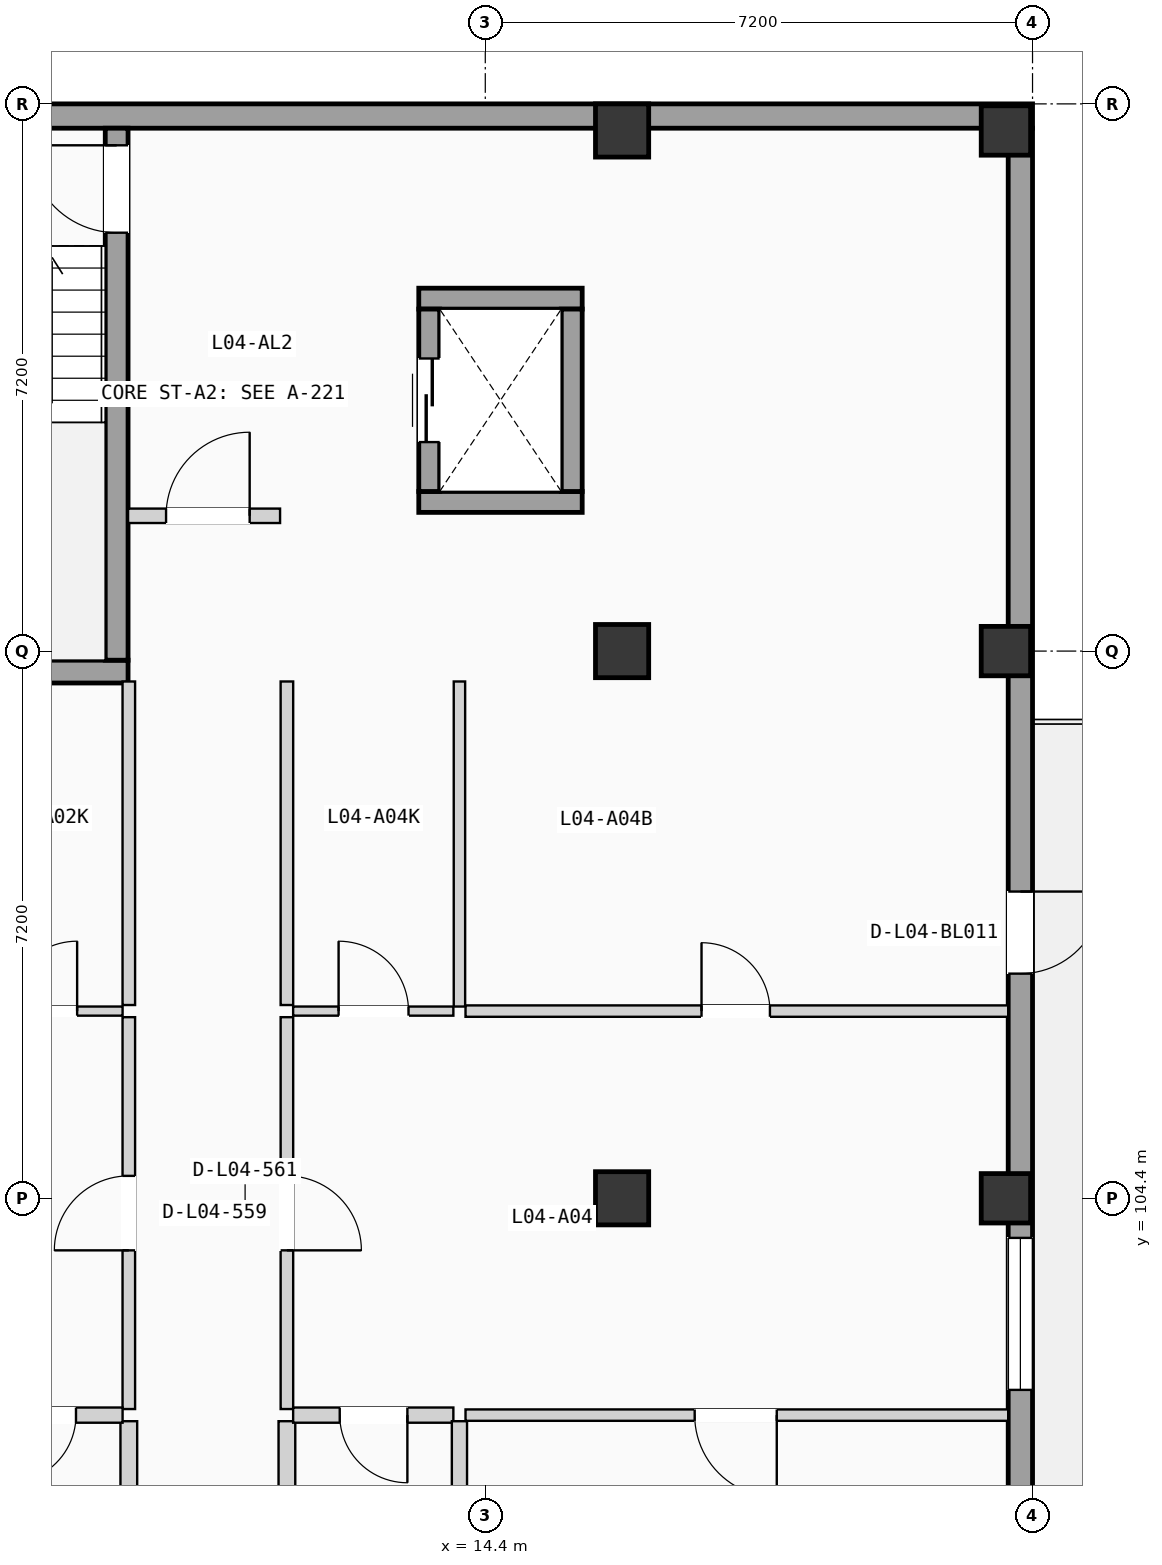
"""IFC4 building model, lengths in metres.
Left out: names, types, materials, properties, quantities, classifications, styles, units other than length and angle.
Written with IfcOpenShell. Run it as: python <this file> out.ifc"""

import sys

from ifc_helpers import new_model, si_unit, direction, frame, frame_2d, origin, origin_2d, place, context, subcontext, project, spatial, rectangle, extrude, element, fill, save


model = new_model("IFC4")
c1 = context("Model", 3, precision=1e-05, world=origin(), true_north=direction((0.0, 1.0)))
c2 = subcontext(c1, "Body", "Model", "MODEL_VIEW")
j1 = project(units=[si_unit("LENGTHUNIT", "METRE"), si_unit("PLANEANGLEUNIT", "RADIAN")], contexts=[c1])
p1 = place(None, origin())
s1 = spatial("IfcSite", under=j1, at=p1, CompositionType="ELEMENT")
p2 = place(p1, origin())
s2 = spatial("IfcBuilding", under=s1, at=p2, CompositionType="ELEMENT")
p3 = place(p2, frame((0.0, 0.0, 15.225)))
s3 = spatial("IfcBuildingStorey", under=s2, at=p3, CompositionType="ELEMENT", Elevation=15.225)
for number, where, z_axis, x_axis in (
    (1, (16.2, 104.4, 0.0), (0.0, 0.0, 1.0), (1.0, 0.0, 0.0)),
    (2, (16.2, 111.6, 0.0), (0.0, 0.0, 1.0), (1.0, 0.0, 0.0)),
    (3, (16.2, 118.45, 0.0), (0.0, 0.0, 1.0), (1.0, 0.0, 0.0)),
):
    element("IfcColumn", number, at=place(p3, frame(where, z_axis=z_axis, x_axis=x_axis)), inside=s3, PredefinedType="COLUMN", context=c2, shape_type="SweptSolid", body=[
        extrude(rectangle(XDim=0.7, YDim=0.7, at=origin_2d()), origin(), (0.0, 0.0, 1.0), 3.15),
    ])
for number, where, z_axis, x_axis in (
    (4, (21.25, 104.4, 0.0), (0.0, 0.0, 1.0), (1.0, 0.0, 0.0)),
    (5, (21.25, 111.6, 0.0), (0.0, 0.0, 1.0), (1.0, 0.0, 0.0)),
    (6, (21.25, 118.45, 0.0), (0.0, 0.0, 1.0), (1.0, 0.0, 0.0)),
):
    element("IfcColumn", number, at=place(p3, frame(where, z_axis=z_axis, x_axis=x_axis)), inside=s3, PredefinedType="COLUMN", context=c2, shape_type="SweptSolid", body=[
        extrude(rectangle(XDim=0.65, YDim=0.65, at=origin_2d()), origin(), (0.0, 0.0, 1.0), 3.15),
    ])
p4 = place(p3, frame((0.0, 118.64, 0.0), z_axis=(0.0, 0.0, 1.0), x_axis=(1.0, 0.0, 0.0)))
e7 = element("IfcWall", 7, at=p4, inside=s3, PredefinedType="SOLIDWALL", context=c2, shape_type="SweptSolid", body=[
    extrude(rectangle(XDim=21.6, YDim=0.32, at=frame_2d((10.8, 0.0))), origin(), (0.0, 0.0, 1.0), 2.89),
])
p5 = place(p3, frame((21.44, 68.72, 0.0), z_axis=(0.0, 0.0, 1.0), x_axis=(0.0, 1.0, 0.0)))
e8 = element("IfcWall", 8, at=p5, inside=s3, PredefinedType="SOLIDWALL", context=c2, shape_type="SweptSolid", body=[
    extrude(rectangle(XDim=49.76, YDim=0.32, at=frame_2d((24.88, 0.0))), origin(), (0.0, 0.0, 1.0), 2.89),
])
p6 = place(p5, frame((16.38, 0.0, 0.0)))
e9 = element("IfcOpeningElement", 9, at=p6, cuts=e8, PredefinedType="OPENING", context=c2, shape_type="SweptSolid", body=[
    extrude(rectangle(XDim=0.95, YDim=2.15, at=frame_2d((0.475, 1.075))), frame((0.0, 0.17, 0.0), z_axis=(0.0, -1.0, 0.0), x_axis=(1.0, 0.0, 0.0)), (0.0, 0.0, 1.0), 0.34),
])
p7 = place(p5, frame((10.07, 0.0, 0.85)))
e10 = element("IfcOpeningElement", 10, at=p7, cuts=e8, PredefinedType="OPENING", context=c2, shape_type="SweptSolid", body=[
    extrude(rectangle(XDim=0.95, YDim=1.2, at=frame_2d((0.475, 0.6))), frame((0.0, 0.17, 0.0), z_axis=(0.0, -1.0, 0.0), x_axis=(1.0, 0.0, 0.0)), (0.0, 0.0, 1.0), 0.34),
])
p8 = place(p5, frame((23.88, 0.0, 0.9)))
e11 = element("IfcOpeningElement", 11, at=p8, cuts=e8, PredefinedType="OPENING", context=c2, shape_type="SweptSolid", body=[
    extrude(rectangle(XDim=2.0, YDim=1.2, at=frame_2d((1.0, 0.6))), frame((0.0, 0.17, 0.0), z_axis=(0.0, -1.0, 0.0), x_axis=(1.0, 0.0, 0.0)), (0.0, 0.0, 1.0), 0.34),
])
p9 = place(p5, frame((33.159, 0.0, 0.855)))
e12 = element("IfcOpeningElement", 12, at=p9, cuts=e8, PredefinedType="OPENING", context=c2, shape_type="SweptSolid", body=[
    extrude(rectangle(XDim=2.0, YDim=1.35, at=frame_2d((1.0, 0.675))), frame((0.0, 0.17, 0.0), z_axis=(0.0, -1.0, 0.0), x_axis=(1.0, 0.0, 0.0)), (0.0, 0.0, 1.0), 0.34),
])
p10 = place(p5, frame((29.749, 0.0, 0.705)))
e13 = element("IfcOpeningElement", 13, at=p10, cuts=e8, PredefinedType="OPENING", context=c2, shape_type="SweptSolid", body=[
    extrude(rectangle(XDim=2.0, YDim=1.5, at=frame_2d((1.0, 0.75))), frame((0.0, 0.17, 0.0), z_axis=(0.0, -1.0, 0.0), x_axis=(1.0, 0.0, 0.0)), (0.0, 0.0, 1.0), 0.34),
])
p11 = place(p5, frame((38.636, 0.0, 0.0)))
e14 = element("IfcOpeningElement", 14, at=p11, cuts=e8, PredefinedType="OPENING", context=c2, shape_type="SweptSolid", body=[
    extrude(rectangle(XDim=1.08, YDim=2.18, at=frame_2d((0.54, 1.09))), frame((0.0, 0.17, 0.0), z_axis=(0.0, -1.0, 0.0), x_axis=(1.0, 0.0, 0.0)), (0.0, 0.0, 1.0), 0.34),
])
p12 = place(p3, frame((5.75, 111.33, 0.0), z_axis=(0.0, 0.0, 1.0), x_axis=(1.0, 0.0, 0.0)))
e15 = element("IfcWall", 15, at=p12, inside=s3, PredefinedType="SHEAR", context=c2, shape_type="SweptSolid", body=[
    extrude(rectangle(XDim=3.95, YDim=0.3, at=frame_2d((1.975, 0.0))), origin(), (0.0, 0.0, 1.0), 2.89),
])
p13 = place(p3, frame((9.55, 111.48, 0.0), z_axis=(0.0, 0.0, 1.0), x_axis=(0.0, 1.0, 0.0)))
e16 = element("IfcWall", 16, at=p13, inside=s3, PredefinedType="SHEAR", context=c2, shape_type="SweptSolid", body=[
    extrude(rectangle(XDim=7.0, YDim=0.3, at=frame_2d((3.5, 0.0))), origin(), (0.0, 0.0, 1.0), 2.89),
])
p14 = place(p13, frame((5.625, 0.0, 0.0)))
e17 = element("IfcOpeningElement", 17, at=p14, cuts=e16, PredefinedType="OPENING", context=c2, shape_type="SweptSolid", body=[
    extrude(rectangle(XDim=1.15, YDim=2.12, at=frame_2d((0.575, 1.06))), frame((0.0, 0.16, 0.0), z_axis=(0.0, -1.0, 0.0), x_axis=(1.0, 0.0, 0.0)), (0.0, 0.0, 1.0), 0.32),
])
for number, where, z_axis, x_axis in (
    (18, (13.525, 113.562, 0.0), (0.0, 0.0, 1.0), (1.0, 0.0, 0.0)),
    (19, (13.525, 116.238, 0.0), (0.0, 0.0, 1.0), (1.0, 0.0, 0.0)),
):
    element("IfcWall", number, at=place(p3, frame(where, z_axis=z_axis, x_axis=x_axis)), inside=s3, PredefinedType="SHEAR", context=c2, shape_type="SweptSolid", body=[
        extrude(rectangle(XDim=2.15, YDim=0.275, at=frame_2d((1.075, 0.0))), origin(), (0.0, 0.0, 1.0), 2.89),
    ])
p15 = place(p3, frame((13.663, 113.7, 0.0), z_axis=(0.0, 0.0, 1.0), x_axis=(0.0, 1.0, 0.0)))
e20 = element("IfcWall", 20, at=p15, inside=s3, PredefinedType="SHEAR", context=c2, shape_type="SweptSolid", body=[
    extrude(rectangle(XDim=2.4, YDim=0.275, at=frame_2d((1.2, 0.0))), origin(), (0.0, 0.0, 1.0), 2.89),
])
p16 = place(p15, frame((0.65, 0.0, 0.0)))
e21 = element("IfcOpeningElement", 21, at=p16, cuts=e20, PredefinedType="OPENING", context=c2, shape_type="SweptSolid", body=[
    extrude(rectangle(XDim=1.1, YDim=2.15, at=frame_2d((0.55, 1.075))), frame((0.0, 0.147, 0.0), z_axis=(0.0, -1.0, 0.0), x_axis=(1.0, 0.0, 0.0)), (0.0, 0.0, 1.0), 0.295),
])
p17 = place(p3, frame((15.538, 113.7, 0.0), z_axis=(0.0, 0.0, 1.0), x_axis=(0.0, 1.0, 0.0)))
e22 = element("IfcWall", 22, at=p17, inside=s3, PredefinedType="SHEAR", context=c2, shape_type="SweptSolid", body=[
    extrude(rectangle(XDim=2.4, YDim=0.275, at=frame_2d((1.2, 0.0))), origin(), (0.0, 0.0, 1.0), 2.89),
])
p18 = place(p3, frame((9.7, 113.38, 0.0), z_axis=(0.0, 0.0, 1.0), x_axis=(1.0, 0.0, 0.0)))
e23 = element("IfcWall", 23, at=p18, inside=s3, PredefinedType="PARTITIONING", context=c2, shape_type="SweptSolid", body=[
    extrude(rectangle(XDim=2.0, YDim=0.19, at=frame_2d((1.0, 0.0))), origin(), (0.0, 0.0, 1.0), 2.87),
])
p19 = place(p18, frame((0.5, 0.0, 0.0)))
e24 = element("IfcOpeningElement", 24, at=p19, cuts=e23, PredefinedType="OPENING", context=c2, shape_type="SweptSolid", body=[
    extrude(rectangle(XDim=1.1, YDim=2.12, at=frame_2d((0.55, 1.06))), frame((0.0, 0.105, 0.0), z_axis=(0.0, -1.0, 0.0), x_axis=(1.0, 0.0, 0.0)), (0.0, 0.0, 1.0), 0.21),
])
p20 = place(p3, frame((9.71, 101.627, 0.0), z_axis=(0.0, 0.0, 1.0), x_axis=(0.0, 1.0, 0.0)))
e25 = element("IfcWall", 25, at=p20, inside=s3, PredefinedType="PARTITIONING", context=c2, shape_type="SweptSolid", body=[
    extrude(rectangle(XDim=5.156, YDim=0.165, at=frame_2d((2.578, 0.0))), origin(), (0.0, 0.0, 1.0), 2.87),
])
p21 = place(p20, frame((2.088, 0.0, 0.0)))
e26 = element("IfcOpeningElement", 26, at=p21, cuts=e25, PredefinedType="OPENING", context=c2, shape_type="SweptSolid", body=[
    extrude(rectangle(XDim=0.98, YDim=2.08, at=frame_2d((0.49, 1.04))), frame((0.0, 0.093, 0.0), z_axis=(0.0, -1.0, 0.0), x_axis=(1.0, 0.0, 0.0)), (0.0, 0.0, 1.0), 0.185),
])
p22 = place(p3, frame((9.71, 97.21, 0.0), z_axis=(0.0, 0.0, 1.0), x_axis=(0.0, 1.0, 0.0)))
e27 = element("IfcWall", 27, at=p22, inside=s3, PredefinedType="PLUMBINGWALL", context=c2, shape_type="SweptSolid", body=[
    extrude(rectangle(XDim=4.257, YDim=0.22, at=frame_2d((2.128, 0.0))), origin(), (0.0, 0.0, 1.0), 2.87),
])
p23 = place(p3, frame((9.71, 106.943, 0.0), z_axis=(0.0, 0.0, 1.0), x_axis=(0.0, 1.0, 0.0)))
e28 = element("IfcWall", 28, at=p23, inside=s3, PredefinedType="PARTITIONING", context=c2, shape_type="SweptSolid", body=[
    extrude(rectangle(XDim=4.257, YDim=0.165, at=frame_2d((2.128, 0.0))), origin(), (0.0, 0.0, 1.0), 2.87),
])
p24 = place(p3, frame((11.79, 101.627, 0.0), z_axis=(0.0, 0.0, 1.0), x_axis=(0.0, 1.0, 0.0)))
e29 = element("IfcWall", 29, at=p24, inside=s3, PredefinedType="PARTITIONING", context=c2, shape_type="SweptSolid", body=[
    extrude(rectangle(XDim=5.156, YDim=0.165, at=frame_2d((2.578, 0.0))), origin(), (0.0, 0.0, 1.0), 2.87),
])
p25 = place(p24, frame((2.088, 0.0, 0.0)))
e30 = element("IfcOpeningElement", 30, at=p25, cuts=e29, PredefinedType="OPENING", context=c2, shape_type="SweptSolid", body=[
    extrude(rectangle(XDim=0.98, YDim=2.08, at=frame_2d((0.49, 1.04))), frame((0.0, 0.093, 0.0), z_axis=(0.0, -1.0, 0.0), x_axis=(1.0, 0.0, 0.0)), (0.0, 0.0, 1.0), 0.185),
])
p26 = place(p3, frame((11.79, 97.21, 0.0), z_axis=(0.0, 0.0, 1.0), x_axis=(0.0, 1.0, 0.0)))
e31 = element("IfcWall", 31, at=p26, inside=s3, PredefinedType="PLUMBINGWALL", context=c2, shape_type="SweptSolid", body=[
    extrude(rectangle(XDim=4.257, YDim=0.22, at=frame_2d((2.128, 0.0))), origin(), (0.0, 0.0, 1.0), 2.87),
])
p27 = place(p3, frame((11.79, 106.943, 0.0), z_axis=(0.0, 0.0, 1.0), x_axis=(0.0, 1.0, 0.0)))
e32 = element("IfcWall", 32, at=p27, inside=s3, PredefinedType="PARTITIONING", context=c2, shape_type="SweptSolid", body=[
    extrude(rectangle(XDim=4.257, YDim=0.165, at=frame_2d((2.128, 0.0))), origin(), (0.0, 0.0, 1.0), 2.87),
])
p28 = place(p3, frame((7.52, 101.547, 0.0), z_axis=(0.0, 0.0, 1.0), x_axis=(1.0, 0.0, 0.0)))
e33 = element("IfcWall", 33, at=p28, inside=s3, PredefinedType="PLUMBINGWALL", context=c2, shape_type="SweptSolid", body=[
    extrude(rectangle(XDim=2.108, YDim=0.2, at=frame_2d((1.054, 0.0))), origin(), (0.0, 0.0, 1.0), 2.87),
])
p29 = place(p28, frame((0.605, 0.0, 0.0)))
e34 = element("IfcOpeningElement", 34, at=p29, cuts=e33, PredefinedType="OPENING", context=c2, shape_type="SweptSolid", body=[
    extrude(rectangle(XDim=0.89, YDim=2.03, at=frame_2d((0.445, 1.015))), frame((0.0, 0.11, 0.0), z_axis=(0.0, -1.0, 0.0), x_axis=(1.0, 0.0, 0.0)), (0.0, 0.0, 1.0), 0.22),
])
p30 = place(p3, frame((7.52, 106.863, 0.0), z_axis=(0.0, 0.0, 1.0), x_axis=(1.0, 0.0, 0.0)))
e35 = element("IfcWall", 35, at=p30, inside=s3, PredefinedType="PARTITIONING", context=c2, shape_type="SweptSolid", body=[
    extrude(rectangle(XDim=2.108, YDim=0.12, at=frame_2d((1.054, 0.0))), origin(), (0.0, 0.0, 1.0), 2.87),
])
p31 = place(p30, frame((0.59, 0.0, 0.0)))
e36 = element("IfcOpeningElement", 36, at=p31, cuts=e35, PredefinedType="OPENING", context=c2, shape_type="SweptSolid", body=[
    extrude(rectangle(XDim=0.92, YDim=2.02, at=frame_2d((0.46, 1.01))), frame((0.0, 0.07, 0.0), z_axis=(0.0, -1.0, 0.0), x_axis=(1.0, 0.0, 0.0)), (0.0, 0.0, 1.0), 0.14),
])
p32 = place(p3, frame((11.872, 101.547, 0.0), z_axis=(0.0, 0.0, 1.0), x_axis=(1.0, 0.0, 0.0)))
e37 = element("IfcWall", 37, at=p32, inside=s3, PredefinedType="PLUMBINGWALL", context=c2, shape_type="SweptSolid", body=[
    extrude(rectangle(XDim=2.108, YDim=0.2, at=frame_2d((1.054, 0.0))), origin(), (0.0, 0.0, 1.0), 2.87),
])
p33 = place(p32, frame((0.613, 0.0, 0.0)))
e38 = element("IfcOpeningElement", 38, at=p33, cuts=e37, PredefinedType="OPENING", context=c2, shape_type="SweptSolid", body=[
    extrude(rectangle(XDim=0.89, YDim=2.03, at=frame_2d((0.445, 1.015))), frame((0.0, 0.11, 0.0), z_axis=(0.0, -1.0, 0.0), x_axis=(1.0, 0.0, 0.0)), (0.0, 0.0, 1.0), 0.22),
])
p34 = place(p3, frame((11.872, 106.863, 0.0), z_axis=(0.0, 0.0, 1.0), x_axis=(1.0, 0.0, 0.0)))
e39 = element("IfcWall", 39, at=p34, inside=s3, PredefinedType="PARTITIONING", context=c2, shape_type="SweptSolid", body=[
    extrude(rectangle(XDim=2.108, YDim=0.12, at=frame_2d((1.054, 0.0))), origin(), (0.0, 0.0, 1.0), 2.87),
])
p35 = place(p34, frame((0.598, 0.0, 0.0)))
e40 = element("IfcOpeningElement", 40, at=p35, cuts=e39, PredefinedType="OPENING", context=c2, shape_type="SweptSolid", body=[
    extrude(rectangle(XDim=0.92, YDim=2.02, at=frame_2d((0.46, 1.01))), frame((0.0, 0.07, 0.0), z_axis=(0.0, -1.0, 0.0), x_axis=(1.0, 0.0, 0.0)), (0.0, 0.0, 1.0), 0.14),
])
p36 = place(p3, frame((14.14, 101.547, 0.0), z_axis=(0.0, 0.0, 1.0), x_axis=(1.0, 0.0, 0.0)))
e41 = element("IfcWall", 41, at=p36, inside=s3, PredefinedType="PARTITIONING", context=c2, shape_type="SweptSolid", body=[
    extrude(rectangle(XDim=7.14, YDim=0.15, at=frame_2d((3.57, 0.0))), origin(), (0.0, 0.0, 1.0), 2.87),
])
p37 = place(p36, frame((3.015, 0.0, 0.0)))
e42 = element("IfcOpeningElement", 42, at=p37, cuts=e41, PredefinedType="OPENING", context=c2, shape_type="SweptSolid", body=[
    extrude(rectangle(XDim=1.08, YDim=2.1, at=frame_2d((0.54, 1.05))), frame((0.0, 0.085, 0.0), z_axis=(0.0, -1.0, 0.0), x_axis=(1.0, 0.0, 0.0)), (0.0, 0.0, 1.0), 0.17),
])
p38 = place(p3, frame((14.14, 106.863, 0.0), z_axis=(0.0, 0.0, 1.0), x_axis=(1.0, 0.0, 0.0)))
e43 = element("IfcWall", 43, at=p38, inside=s3, PredefinedType="PARTITIONING", context=c2, shape_type="SweptSolid", body=[
    extrude(rectangle(XDim=7.14, YDim=0.15, at=frame_2d((3.57, 0.0))), origin(), (0.0, 0.0, 1.0), 2.87),
])
p39 = place(p38, frame((3.105, 0.0, 0.0)))
e44 = element("IfcOpeningElement", 44, at=p39, cuts=e43, PredefinedType="OPENING", context=c2, shape_type="SweptSolid", body=[
    extrude(rectangle(XDim=0.9, YDim=2.04, at=frame_2d((0.45, 1.02))), frame((0.0, 0.085, 0.0), z_axis=(0.0, -1.0, 0.0), x_axis=(1.0, 0.0, 0.0)), (0.0, 0.0, 1.0), 0.17),
])
p40 = place(p3, frame((14.06, 97.21, 0.0), z_axis=(0.0, 0.0, 1.0), x_axis=(0.0, 1.0, 0.0)))
e45 = element("IfcWall", 45, at=p40, inside=s3, PredefinedType="PLUMBINGWALL", context=c2, shape_type="SweptSolid", body=[
    extrude(rectangle(XDim=4.257, YDim=0.2, at=frame_2d((2.128, 0.0))), origin(), (0.0, 0.0, 1.0), 2.87),
])
p41 = place(p3, frame((14.06, 106.923, 0.0), z_axis=(0.0, 0.0, 1.0), x_axis=(0.0, 1.0, 0.0)))
e46 = element("IfcWall", 46, at=p41, inside=s3, PredefinedType="PARTITIONING", context=c2, shape_type="SweptSolid", body=[
    extrude(rectangle(XDim=4.277, YDim=0.15, at=frame_2d((2.138, 0.0))), origin(), (0.0, 0.0, 1.0), 2.87),
])
p42 = place(p9, origin())
e47 = element("IfcWindow", 47, at=p42, inside=s3, PartitioningType="DOUBLE_PANEL_VERTICAL", PredefinedType="WINDOW", context=c2, shape_type="SweptSolid", body=[
    extrude(rectangle(XDim=2.0, YDim=1.35, at=frame_2d((1.0, 0.675))), frame((0.0, 0.03, 0.0), z_axis=(0.0, -1.0, 0.0), x_axis=(1.0, 0.0, 0.0)), (0.0, 0.0, 1.0), 0.06),
])
fill(e12, e47)
p43 = place(p11, frame((1.08, 0.0, 0.0), z_axis=(0.0, 0.0, 1.0), x_axis=(-1.0, 0.0, 0.0)))
e48 = element("IfcDoor", 48, at=p43, inside=s3, OperationType="SINGLE_SWING_RIGHT", PredefinedType="DOOR", context=c2, shape_type="SweptSolid", body=[
    extrude(rectangle(XDim=1.08, YDim=2.18, at=frame_2d((0.54, 1.09))), frame((0.0, 0.025, 0.0), z_axis=(0.0, -1.0, 0.0), x_axis=(1.0, 0.0, 0.0)), (0.0, 0.0, 1.0), 0.05),
])
fill(e14, e48)
p44 = place(p14, origin())
e49 = element("IfcDoor", 49, at=p44, inside=s3, OperationType="SINGLE_SWING_RIGHT", PredefinedType="DOOR", context=c2, shape_type="SweptSolid", body=[
    extrude(rectangle(XDim=1.15, YDim=2.12, at=frame_2d((0.575, 1.06))), frame((0.0, 0.025, 0.0), z_axis=(0.0, -1.0, 0.0), x_axis=(1.0, 0.0, 0.0)), (0.0, 0.0, 1.0), 0.05),
])
fill(e17, e49)
p45 = place(p16, origin())
e50 = element("IfcDoor", 50, at=p45, inside=s3, OperationType="SLIDING_TO_LEFT", PredefinedType="DOOR", context=c2, shape_type="SweptSolid", body=[
    extrude(rectangle(XDim=1.1, YDim=2.15, at=frame_2d((0.55, 1.075))), frame((0.0, 0.025, 0.0), z_axis=(0.0, -1.0, 0.0), x_axis=(1.0, 0.0, 0.0)), (0.0, 0.0, 1.0), 0.05),
])
fill(e21, e50)
p46 = place(p19, origin())
e51 = element("IfcDoor", 51, at=p46, inside=s3, OperationType="SINGLE_SWING_RIGHT", PredefinedType="DOOR", context=c2, shape_type="SweptSolid", body=[
    extrude(rectangle(XDim=1.1, YDim=2.12, at=frame_2d((0.55, 1.06))), frame((0.0, 0.025, 0.0), z_axis=(0.0, -1.0, 0.0), x_axis=(1.0, 0.0, 0.0)), (0.0, 0.0, 1.0), 0.05),
])
fill(e24, e51)
p47 = place(p21, origin())
e52 = element("IfcDoor", 52, at=p47, inside=s3, OperationType="SINGLE_SWING_LEFT", PredefinedType="DOOR", context=c2, shape_type="SweptSolid", body=[
    extrude(rectangle(XDim=0.98, YDim=2.08, at=frame_2d((0.49, 1.04))), frame((0.0, 0.025, 0.0), z_axis=(0.0, -1.0, 0.0), x_axis=(1.0, 0.0, 0.0)), (0.0, 0.0, 1.0), 0.05),
])
fill(e26, e52)
p48 = place(p25, frame((0.98, 0.0, 0.0), z_axis=(0.0, 0.0, 1.0), x_axis=(-1.0, 0.0, 0.0)))
e53 = element("IfcDoor", 53, at=p48, inside=s3, OperationType="SINGLE_SWING_LEFT", PredefinedType="DOOR", context=c2, shape_type="SweptSolid", body=[
    extrude(rectangle(XDim=0.98, YDim=2.08, at=frame_2d((0.49, 1.04))), frame((0.0, 0.025, 0.0), z_axis=(0.0, -1.0, 0.0), x_axis=(1.0, 0.0, 0.0)), (0.0, 0.0, 1.0), 0.05),
])
fill(e30, e53)
p49 = place(p29, frame((0.89, 0.0, 0.0), z_axis=(0.0, 0.0, 1.0), x_axis=(-1.0, 0.0, 0.0)))
e54 = element("IfcDoor", 54, at=p49, inside=s3, OperationType="SINGLE_SWING_LEFT", PredefinedType="DOOR", context=c2, shape_type="SweptSolid", body=[
    extrude(rectangle(XDim=0.89, YDim=2.03, at=frame_2d((0.445, 1.015))), frame((0.0, 0.025, 0.0), z_axis=(0.0, -1.0, 0.0), x_axis=(1.0, 0.0, 0.0)), (0.0, 0.0, 1.0), 0.05),
])
fill(e34, e54)
p50 = place(p31, origin())
e55 = element("IfcDoor", 55, at=p50, inside=s3, OperationType="SINGLE_SWING_RIGHT", PredefinedType="DOOR", context=c2, shape_type="SweptSolid", body=[
    extrude(rectangle(XDim=0.92, YDim=2.02, at=frame_2d((0.46, 1.01))), frame((0.0, 0.025, 0.0), z_axis=(0.0, -1.0, 0.0), x_axis=(1.0, 0.0, 0.0)), (0.0, 0.0, 1.0), 0.05),
])
fill(e36, e55)
p51 = place(p33, frame((0.89, 0.0, 0.0), z_axis=(0.0, 0.0, 1.0), x_axis=(-1.0, 0.0, 0.0)))
e56 = element("IfcDoor", 56, at=p51, inside=s3, OperationType="SINGLE_SWING_RIGHT", PredefinedType="DOOR", context=c2, shape_type="SweptSolid", body=[
    extrude(rectangle(XDim=0.89, YDim=2.03, at=frame_2d((0.445, 1.015))), frame((0.0, 0.025, 0.0), z_axis=(0.0, -1.0, 0.0), x_axis=(1.0, 0.0, 0.0)), (0.0, 0.0, 1.0), 0.05),
])
fill(e38, e56)
p52 = place(p35, origin())
e57 = element("IfcDoor", 57, at=p52, inside=s3, OperationType="SINGLE_SWING_LEFT", PredefinedType="DOOR", context=c2, shape_type="SweptSolid", body=[
    extrude(rectangle(XDim=0.92, YDim=2.02, at=frame_2d((0.46, 1.01))), frame((0.0, 0.025, 0.0), z_axis=(0.0, -1.0, 0.0), x_axis=(1.0, 0.0, 0.0)), (0.0, 0.0, 1.0), 0.05),
])
fill(e40, e57)
p53 = place(p37, frame((1.08, 0.0, 0.0), z_axis=(0.0, 0.0, 1.0), x_axis=(-1.0, 0.0, 0.0)))
e58 = element("IfcDoor", 58, at=p53, inside=s3, OperationType="SINGLE_SWING_RIGHT", PredefinedType="DOOR", context=c2, shape_type="SweptSolid", body=[
    extrude(rectangle(XDim=1.08, YDim=2.1, at=frame_2d((0.54, 1.05))), frame((0.0, 0.025, 0.0), z_axis=(0.0, -1.0, 0.0), x_axis=(1.0, 0.0, 0.0)), (0.0, 0.0, 1.0), 0.05),
])
fill(e42, e58)
p54 = place(p39, origin())
e59 = element("IfcDoor", 59, at=p54, inside=s3, OperationType="SINGLE_SWING_LEFT", PredefinedType="DOOR", context=c2, shape_type="SweptSolid", body=[
    extrude(rectangle(XDim=0.9, YDim=2.04, at=frame_2d((0.45, 1.02))), frame((0.0, 0.025, 0.0), z_axis=(0.0, -1.0, 0.0), x_axis=(1.0, 0.0, 0.0)), (0.0, 0.0, 1.0), 0.05),
])
fill(e44, e59)
save(model, sys.argv[1])
